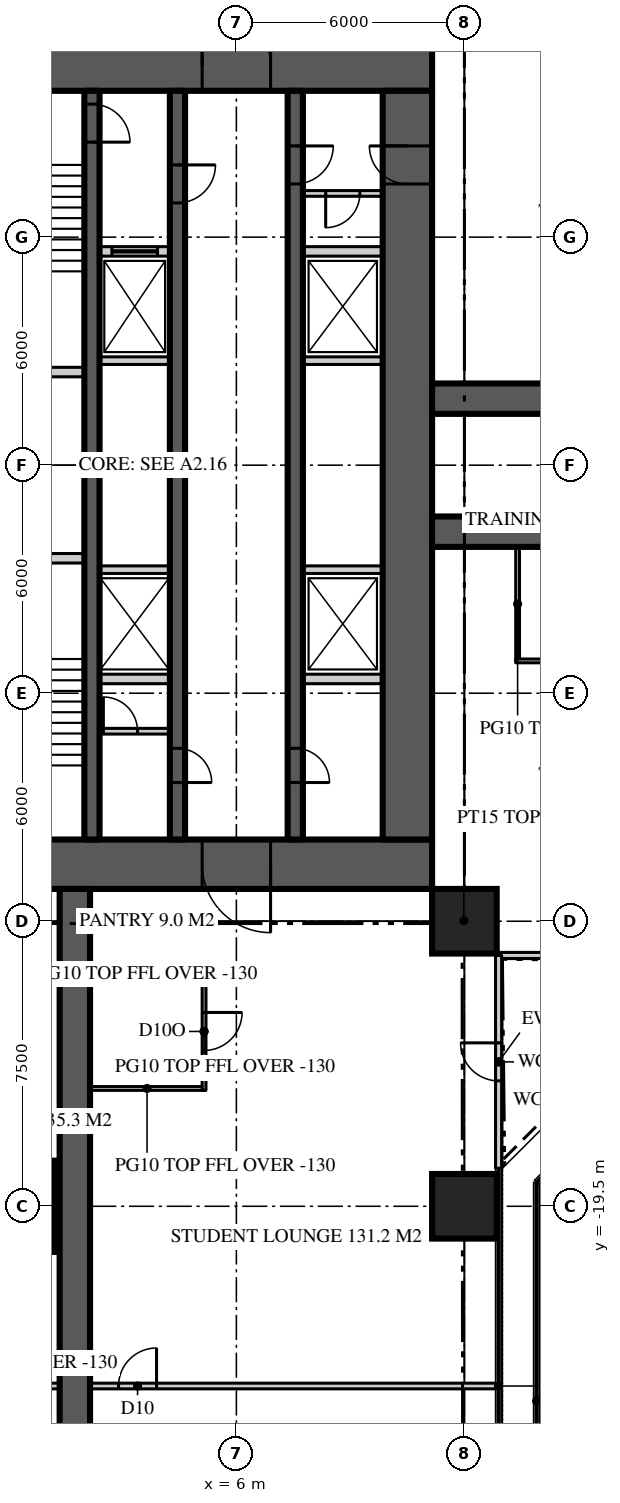
"""IFC4 building model, lengths in metres.
Left out: names, types, materials, properties, quantities, classifications, styles, units other than length and angle.
Written with IfcOpenShell. Run it as: python <this file> out.ifc"""

import sys

from ifc_helpers import new_model, si_unit, direction, frame, frame_2d, origin, origin_2d, place, context, subcontext, project, spatial, rectangle, extrude, element, fill, save


model = new_model("IFC4")
c1 = context("Model", 3, precision=1e-05, world=origin(), true_north=direction((0.0, 1.0)))
c2 = subcontext(c1, "Body", "Model", "MODEL_VIEW")
j1 = project(units=[si_unit("LENGTHUNIT", "METRE"), si_unit("PLANEANGLEUNIT", "RADIAN")], contexts=[c1])
p1 = place(None, origin())
s1 = spatial("IfcSite", under=j1, at=p1, CompositionType="ELEMENT")
p2 = place(p1, origin())
s2 = spatial("IfcBuilding", under=s1, at=p2, CompositionType="ELEMENT")
p3 = place(p2, frame((0.0, 0.0, 109.8)))
s3 = spatial("IfcBuildingStorey", under=s2, at=p3, CompositionType="ELEMENT", Elevation=109.8)
p4 = place(p3, frame((-11.15, 10.5, 0.0), z_axis=(0.0, 0.0, 1.0), x_axis=(1.0, 0.0, 0.0)))
e1 = element("IfcWall", 1, at=p4, inside=s3, PredefinedType="SHEAR", context=c2, shape_type="SweptSolid", body=[
    extrude(rectangle(XDim=22.3, YDim=1.3, at=frame_2d((11.15, 0.0))), origin(), (0.0, 0.0, 1.0), 3.9),
])
p5 = place(p4, frame((4.25, 0.0, 0.0)))
e2 = element("IfcOpeningElement", 2, at=p5, cuts=e1, PredefinedType="OPENING", context=c2, shape_type="SweptSolid", body=[
    extrude(rectangle(XDim=1.8, YDim=2.2, at=frame_2d((0.9, 1.1))), frame((0.0, 0.66, 0.0), z_axis=(0.0, -1.0, 0.0), x_axis=(1.0, 0.0, 0.0)), (0.0, 0.0, 1.0), 1.32),
])
p6 = place(p4, frame((16.25, 0.0, 0.0)))
e3 = element("IfcOpeningElement", 3, at=p6, cuts=e1, PredefinedType="OPENING", context=c2, shape_type="SweptSolid", body=[
    extrude(rectangle(XDim=1.8, YDim=2.2, at=frame_2d((0.9, 1.1))), frame((0.0, 0.66, 0.0), z_axis=(0.0, -1.0, 0.0), x_axis=(1.0, 0.0, 0.0)), (0.0, 0.0, 1.0), 1.32),
])
p7 = place(p3, frame((11.15, -10.5, 0.0), z_axis=(0.0, 0.0, 1.0), x_axis=(-1.0, 0.0, 0.0)))
e4 = element("IfcWall", 4, at=p7, inside=s3, PredefinedType="SHEAR", context=c2, shape_type="SweptSolid", body=[
    extrude(rectangle(XDim=22.3, YDim=1.3, at=frame_2d((11.15, 0.0))), origin(), (0.0, 0.0, 1.0), 3.9),
])
p8 = place(p7, frame((16.25, 0.0, 0.0)))
e5 = element("IfcOpeningElement", 5, at=p8, cuts=e4, PredefinedType="OPENING", context=c2, shape_type="SweptSolid", body=[
    extrude(rectangle(XDim=1.8, YDim=2.2, at=frame_2d((0.9, 1.1))), frame((0.0, 0.66, 0.0), z_axis=(0.0, -1.0, 0.0), x_axis=(1.0, 0.0, 0.0)), (0.0, 0.0, 1.0), 1.32),
])
p9 = place(p7, frame((4.25, 0.0, 0.0)))
e6 = element("IfcOpeningElement", 6, at=p9, cuts=e4, PredefinedType="OPENING", context=c2, shape_type="SweptSolid", body=[
    extrude(rectangle(XDim=1.8, YDim=2.2, at=frame_2d((0.9, 1.1))), frame((0.0, 0.66, 0.0), z_axis=(0.0, -1.0, 0.0), x_axis=(1.0, 0.0, 0.0)), (0.0, 0.0, 1.0), 1.32),
])
p10 = place(p3, frame((10.5, -9.85, 0.0), z_axis=(0.0, 0.0, 1.0), x_axis=(0.0, 1.0, 0.0)))
e7 = element("IfcWall", 7, at=p10, inside=s3, PredefinedType="SHEAR", context=c2, shape_type="SweptSolid", body=[
    extrude(rectangle(XDim=19.7, YDim=1.3, at=frame_2d((9.85, 0.0))), origin(), (0.0, 0.0, 1.0), 3.9),
])
p11 = place(p10, frame((17.25, 0.0, 0.0)))
e8 = element("IfcOpeningElement", 8, at=p11, cuts=e7, PredefinedType="OPENING", context=c2, shape_type="SweptSolid", body=[
    extrude(rectangle(XDim=1.0, YDim=2.2, at=frame_2d((0.5, 1.1))), frame((0.0, 0.66, 0.0), z_axis=(0.0, -1.0, 0.0), x_axis=(1.0, 0.0, 0.0)), (0.0, 0.0, 1.0), 1.32),
])
for number, where, z_axis, x_axis in (
    (9, (11.15, -1.75, 0.0), (0.0, 0.0, 1.0), (1.0, 0.0, 0.0)),
    (10, (11.15, 1.75, 0.0), (0.0, 0.0, 1.0), (1.0, 0.0, 0.0)),
    (11, (1.75, -11.15, 0.0), (0.0, 0.0, 1.0), (0.0, -1.0, 0.0)),
):
    element("IfcWall", number, at=place(p3, frame(where, z_axis=z_axis, x_axis=x_axis)), inside=s3, PredefinedType="SHEAR", context=c2, shape_type="SweptSolid", body=[
        extrude(rectangle(XDim=15.25, YDim=0.8, at=frame_2d((7.625, 0.0))), origin(), (0.0, 0.0, 1.0), 3.9),
    ])
p12 = place(p3, frame((0.0, -19.5, 0.0), z_axis=(0.0, 0.0, 1.0), x_axis=(1.0, 0.0, 0.0)))
e12 = element("IfcColumn", 12, at=p12, inside=s3, PredefinedType="COLUMN", context=c2, shape_type="SweptSolid", body=[
    extrude(rectangle(XDim=2.4, YDim=2.4, at=origin_2d()), origin(), (0.0, 0.0, 1.0), 3.9),
])
for number, where, z_axis, x_axis in (
    (13, (12.0, -19.5, 0.0), (0.0, 0.0, 1.0), (1.0, 0.0, 0.0)),
    (14, (12.0, -12.0, 0.0), (0.0, 0.0, 1.0), (1.0, 0.0, 0.0)),
):
    element("IfcColumn", number, at=place(p3, frame(where, z_axis=z_axis, x_axis=x_axis)), inside=s3, PredefinedType="COLUMN", context=c2, shape_type="SweptSolid", body=[
        extrude(rectangle(XDim=1.7, YDim=1.7, at=origin_2d()), origin(), (0.0, 0.0, 1.0), 3.9),
    ])
p13 = place(p3, frame((12.9, -12.9, 0.0), z_axis=(0.0, 0.0, 1.0), x_axis=(1.0, 0.0, 0.0)))
e15 = element("IfcWall", 15, at=p13, inside=s3, PredefinedType="SOLIDWALL", context=c2, shape_type="SweptSolid", body=[
    extrude(rectangle(XDim=5.6, YDim=0.16, at=frame_2d((2.8, 0.0))), origin(), (0.0, 0.0, 1.0), 3.77),
])
p14 = place(p3, frame((12.9, -18.5, 0.0), z_axis=(0.0, 0.0, 1.0), x_axis=(0.0, 1.0, 0.0)))
e16 = element("IfcWall", 16, at=p14, inside=s3, PredefinedType="SOLIDWALL", context=c2, shape_type="SweptSolid", body=[
    extrude(rectangle(XDim=5.6, YDim=0.16, at=frame_2d((2.8, 0.0))), origin(), (0.0, 0.0, 1.0), 3.77),
])
p15 = place(p14, frame((2.3, 0.0, 0.0)))
e17 = element("IfcOpeningElement", 17, at=p15, cuts=e16, PredefinedType="OPENING", context=c2, shape_type="SweptSolid", body=[
    extrude(rectangle(XDim=1.0, YDim=2.2, at=frame_2d((0.5, 1.1))), frame((0.0, 0.09, 0.0), z_axis=(0.0, -1.0, 0.0), x_axis=(1.0, 0.0, 0.0)), (0.0, 0.0, 1.0), 0.18),
])
p16 = place(p3, frame((7.55, 9.85, 0.0), z_axis=(0.0, 0.0, 1.0), x_axis=(0.0, -1.0, 0.0)))
e18 = element("IfcWall", 18, at=p16, inside=s3, PredefinedType="SHEAR", context=c2, shape_type="SweptSolid", body=[
    extrude(rectangle(XDim=19.7, YDim=0.4, at=frame_2d((9.85, 0.0))), origin(), (0.0, 0.0, 1.0), 3.9),
])
p17 = place(p16, frame((1.45, 0.0, 0.0)))
e19 = element("IfcOpeningElement", 19, at=p17, cuts=e18, PredefinedType="OPENING", context=c2, shape_type="SweptSolid", body=[
    extrude(rectangle(XDim=1.0, YDim=2.2, at=frame_2d((0.5, 1.1))), frame((0.0, 0.21, 0.0), z_axis=(0.0, -1.0, 0.0), x_axis=(1.0, 0.0, 0.0)), (0.0, 0.0, 1.0), 0.42),
])
p18 = place(p16, frame((17.3, 0.0, 0.0)))
e20 = element("IfcOpeningElement", 20, at=p18, cuts=e18, PredefinedType="OPENING", context=c2, shape_type="SweptSolid", body=[
    extrude(rectangle(XDim=0.9, YDim=2.1, at=frame_2d((0.45, 1.05))), frame((0.0, 0.21, 0.0), z_axis=(0.0, -1.0, 0.0), x_axis=(1.0, 0.0, 0.0)), (0.0, 0.0, 1.0), 0.42),
])
p19 = place(p3, frame((4.45, 9.85, 0.0), z_axis=(0.0, 0.0, 1.0), x_axis=(0.0, -1.0, 0.0)))
e21 = element("IfcWall", 21, at=p19, inside=s3, PredefinedType="SHEAR", context=c2, shape_type="SweptSolid", body=[
    extrude(rectangle(XDim=19.7, YDim=0.4, at=frame_2d((9.85, 0.0))), origin(), (0.0, 0.0, 1.0), 3.9),
])
p20 = place(p19, frame((1.95, 0.0, 0.0)))
e22 = element("IfcOpeningElement", 22, at=p20, cuts=e21, PredefinedType="OPENING", context=c2, shape_type="SweptSolid", body=[
    extrude(rectangle(XDim=1.0, YDim=2.2, at=frame_2d((0.5, 1.1))), frame((0.0, 0.21, 0.0), z_axis=(0.0, -1.0, 0.0), x_axis=(1.0, 0.0, 0.0)), (0.0, 0.0, 1.0), 0.42),
])
p21 = place(p19, frame((17.3, 0.0, 0.0)))
e23 = element("IfcOpeningElement", 23, at=p21, cuts=e21, PredefinedType="OPENING", context=c2, shape_type="SweptSolid", body=[
    extrude(rectangle(XDim=0.9, YDim=2.1, at=frame_2d((0.45, 1.05))), frame((0.0, 0.21, 0.0), z_axis=(0.0, -1.0, 0.0), x_axis=(1.0, 0.0, 0.0)), (0.0, 0.0, 1.0), 0.42),
])
p22 = place(p3, frame((2.2, 9.85, 0.0), z_axis=(0.0, 0.0, 1.0), x_axis=(0.0, -1.0, 0.0)))
e24 = element("IfcWall", 24, at=p22, inside=s3, PredefinedType="SHEAR", context=c2, shape_type="SweptSolid", body=[
    extrude(rectangle(XDim=19.7, YDim=0.4, at=frame_2d((9.85, 0.0))), origin(), (0.0, 0.0, 1.0), 3.9),
])
p23 = place(p22, frame((0.35, 0.0, 0.0)))
e25 = element("IfcOpeningElement", 25, at=p23, cuts=e24, PredefinedType="OPENING", context=c2, shape_type="SweptSolid", body=[
    extrude(rectangle(XDim=1.0, YDim=2.2, at=frame_2d((0.5, 1.1))), frame((0.0, 0.21, 0.0), z_axis=(0.0, -1.0, 0.0), x_axis=(1.0, 0.0, 0.0)), (0.0, 0.0, 1.0), 0.42),
])
p24 = place(p3, frame((2.4, 5.625, 0.0), z_axis=(0.0, 0.0, 1.0), x_axis=(1.0, 0.0, 0.0)))
e26 = element("IfcWall", 26, at=p24, inside=s3, PredefinedType="SOLIDWALL", context=c2, shape_type="SweptSolid", body=[
    extrude(rectangle(XDim=1.85, YDim=0.25, at=frame_2d((0.925, 0.0))), origin(), (0.0, 0.0, 1.0), 3.7),
])
p25 = place(p24, frame((0.325, 0.0, 0.0)))
e27 = element("IfcOpeningElement", 27, at=p25, cuts=e26, PredefinedType="OPENING", context=c2, shape_type="SweptSolid", body=[
    extrude(rectangle(XDim=1.2, YDim=2.2, at=frame_2d((0.6, 1.1))), frame((0.0, 0.135, 0.0), z_axis=(0.0, -1.0, 0.0), x_axis=(1.0, 0.0, 0.0)), (0.0, 0.0, 1.0), 0.27),
])
p26 = place(p3, frame((7.75, 5.625, 0.0), z_axis=(0.0, 0.0, 1.0), x_axis=(1.0, 0.0, 0.0)))
e28 = element("IfcWall", 28, at=p26, inside=s3, PredefinedType="SOLIDWALL", context=c2, shape_type="SweptSolid", body=[
    extrude(rectangle(XDim=2.1, YDim=0.25, at=frame_2d((1.05, 0.0))), origin(), (0.0, 0.0, 1.0), 3.7),
])
p27 = place(p3, frame((2.4, -5.625, 0.0), z_axis=(0.0, 0.0, 1.0), x_axis=(1.0, 0.0, 0.0)))
e29 = element("IfcWall", 29, at=p27, inside=s3, PredefinedType="SOLIDWALL", context=c2, shape_type="SweptSolid", body=[
    extrude(rectangle(XDim=1.85, YDim=0.25, at=frame_2d((0.925, 0.0))), origin(), (0.0, 0.0, 1.0), 3.7),
])
p28 = place(p3, frame((7.75, -5.625, 0.0), z_axis=(0.0, 0.0, 1.0), x_axis=(1.0, 0.0, 0.0)))
e30 = element("IfcWall", 30, at=p28, inside=s3, PredefinedType="SOLIDWALL", context=c2, shape_type="SweptSolid", body=[
    extrude(rectangle(XDim=2.1, YDim=0.25, at=frame_2d((1.05, 0.0))), origin(), (0.0, 0.0, 1.0), 3.7),
])
for number, where, z_axis, x_axis in (
    (31, (-2.0, -2.45, 0.0), (0.0, 0.0, 1.0), (1.0, 0.0, 0.0)),
    (32, (-2.0, 2.45, 0.0), (0.0, 0.0, 1.0), (1.0, 0.0, 0.0)),
):
    element("IfcWall", number, at=place(p3, frame(where, z_axis=z_axis, x_axis=x_axis)), inside=s3, PredefinedType="SOLIDWALL", context=c2, shape_type="SweptSolid", body=[
        extrude(rectangle(XDim=4.0, YDim=0.25, at=frame_2d((2.0, 0.0))), origin(), (0.0, 0.0, 1.0), 3.7),
    ])
p29 = place(p3, frame((2.4, -2.75, 0.0), z_axis=(0.0, 0.0, 1.0), x_axis=(1.0, 0.0, 0.0)))
e33 = element("IfcWall", 33, at=p29, inside=s3, PredefinedType="SOLIDWALL", context=c2, shape_type="SweptSolid", body=[
    extrude(rectangle(XDim=1.85, YDim=0.2, at=frame_2d((0.925, 0.0))), origin(), (0.0, 0.0, 1.0), 3.7),
])
p30 = place(p3, frame((7.75, -2.75, 0.0), z_axis=(0.0, 0.0, 1.0), x_axis=(1.0, 0.0, 0.0)))
e34 = element("IfcWall", 34, at=p30, inside=s3, PredefinedType="SOLIDWALL", context=c2, shape_type="SweptSolid", body=[
    extrude(rectangle(XDim=2.1, YDim=0.2, at=frame_2d((1.05, 0.0))), origin(), (0.0, 0.0, 1.0), 3.7),
])
p31 = place(p3, frame((2.4, 2.75, 0.0), z_axis=(0.0, 0.0, 1.0), x_axis=(1.0, 0.0, 0.0)))
e35 = element("IfcWall", 35, at=p31, inside=s3, PredefinedType="SOLIDWALL", context=c2, shape_type="SweptSolid", body=[
    extrude(rectangle(XDim=1.85, YDim=0.2, at=frame_2d((0.925, 0.0))), origin(), (0.0, 0.0, 1.0), 3.7),
])
p32 = place(p3, frame((7.75, 2.75, 0.0), z_axis=(0.0, 0.0, 1.0), x_axis=(1.0, 0.0, 0.0)))
e36 = element("IfcWall", 36, at=p32, inside=s3, PredefinedType="SOLIDWALL", context=c2, shape_type="SweptSolid", body=[
    extrude(rectangle(XDim=2.1, YDim=0.2, at=frame_2d((1.05, 0.0))), origin(), (0.0, 0.0, 1.0), 3.7),
])
p33 = place(p3, frame((13.4, -2.15, 0.0), z_axis=(0.0, 0.0, 1.0), x_axis=(0.0, -1.0, 0.0)))
e37 = element("IfcWall", 37, at=p33, inside=s3, PredefinedType="PARTITIONING", context=c2, shape_type="SweptSolid", body=[
    extrude(rectangle(XDim=3.0, YDim=0.1, at=frame_2d((1.5, 0.0))), origin(), (0.0, 0.0, 1.0), 3.77),
])
p34 = place(p3, frame((13.35, -5.15, 0.0), z_axis=(0.0, 0.0, 1.0), x_axis=(1.0, 0.0, 0.0)))
e38 = element("IfcWall", 38, at=p34, inside=s3, PredefinedType="PARTITIONING", context=c2, shape_type="SweptSolid", body=[
    extrude(rectangle(XDim=3.1, YDim=0.1, at=frame_2d((1.55, 0.0))), origin(), (0.0, 0.0, 1.0), 3.77),
])
p35 = place(p34, frame((1.05, 0.0, 0.0)))
e39 = element("IfcOpeningElement", 39, at=p35, cuts=e38, PredefinedType="OPENING", context=c2, shape_type="SweptSolid", body=[
    extrude(rectangle(XDim=1.0, YDim=2.2, at=frame_2d((0.5, 1.1))), frame((0.0, 0.06, 0.0), z_axis=(0.0, -1.0, 0.0), x_axis=(1.0, 0.0, 0.0)), (0.0, 0.0, 1.0), 0.12),
])
p36 = place(p3, frame((-12.82, -24.229, 0.0), z_axis=(0.0, 0.0, 1.0), x_axis=(1.0, 0.0, 0.0)))
e40 = element("IfcWall", 40, at=p36, inside=s3, PredefinedType="PARTITIONING", context=c2, shape_type="SweptSolid", body=[
    extrude(rectangle(XDim=25.64, YDim=0.15, at=frame_2d((12.82, 0.0))), origin(), (0.0, 0.0, 1.0), 3.77),
])
p37 = place(p36, frame((15.72, 0.0, 0.0)))
e41 = element("IfcOpeningElement", 41, at=p37, cuts=e40, PredefinedType="OPENING", context=c2, shape_type="SweptSolid", body=[
    extrude(rectangle(XDim=1.0, YDim=2.2, at=frame_2d((0.5, 1.1))), frame((0.0, 0.085, 0.0), z_axis=(0.0, -1.0, 0.0), x_axis=(1.0, 0.0, 0.0)), (0.0, 0.0, 1.0), 0.17),
])
p38 = place(p36, frame((8.92, 0.0, 0.0)))
e42 = element("IfcOpeningElement", 42, at=p38, cuts=e40, PredefinedType="OPENING", context=c2, shape_type="SweptSolid", body=[
    extrude(rectangle(XDim=1.0, YDim=2.2, at=frame_2d((0.5, 1.1))), frame((0.0, 0.085, 0.0), z_axis=(0.0, -1.0, 0.0), x_axis=(1.0, 0.0, 0.0)), (0.0, 0.0, 1.0), 0.17),
])
for number, where, z_axis, x_axis in (
    (43, (2.15, -13.4, 0.0), (0.0, 0.0, 1.0), (1.0, 0.0, 0.0)),
    (44, (2.15, -16.4, 0.0), (0.0, 0.0, 1.0), (1.0, 0.0, 0.0)),
):
    element("IfcWall", number, at=place(p3, frame(where, z_axis=z_axis, x_axis=x_axis)), inside=s3, PredefinedType="PARTITIONING", context=c2, shape_type="SweptSolid", body=[
        extrude(rectangle(XDim=3.0, YDim=0.1, at=frame_2d((1.5, 0.0))), origin(), (0.0, 0.0, 1.0), 3.77),
    ])
p39 = place(p3, frame((5.15, -13.35, 0.0), z_axis=(0.0, 0.0, 1.0), x_axis=(0.0, -1.0, 0.0)))
e45 = element("IfcWall", 45, at=p39, inside=s3, PredefinedType="PARTITIONING", context=c2, shape_type="SweptSolid", body=[
    extrude(rectangle(XDim=3.1, YDim=0.1, at=frame_2d((1.55, 0.0))), origin(), (0.0, 0.0, 1.0), 3.77),
])
p40 = place(p39, frame((1.05, 0.0, 0.0)))
e46 = element("IfcOpeningElement", 46, at=p40, cuts=e45, PredefinedType="OPENING", context=c2, shape_type="SweptSolid", body=[
    extrude(rectangle(XDim=1.0, YDim=2.2, at=frame_2d((0.5, 1.1))), frame((0.0, 0.06, 0.0), z_axis=(0.0, -1.0, 0.0), x_axis=(1.0, 0.0, 0.0)), (0.0, 0.0, 1.0), 0.12),
])
p41 = place(p3, frame((11.15, -11.15, 0.0), z_axis=(0.0, 0.0, 1.0), x_axis=(0.707106781187, -0.707106781187, 0.0)))
e47 = element("IfcWall", 47, at=p41, inside=s3, PredefinedType="PARTITIONING", context=c2, shape_type="SweptSolid", body=[
    extrude(rectangle(XDim=2.362, YDim=0.15, at=frame_2d((1.181, 0.0))), origin(), (0.0, 0.0, 1.0), 3.77),
])
p42 = place(p3, frame((2.4, -7.0, 0.0), z_axis=(0.0, 0.0, 1.0), x_axis=(1.0, 0.0, 0.0)))
e48 = element("IfcWall", 48, at=p42, inside=s3, PredefinedType="SOLIDWALL", context=c2, shape_type="SweptSolid", body=[
    extrude(rectangle(XDim=1.85, YDim=0.15, at=frame_2d((0.925, 0.0))), origin(), (0.0, 0.0, 1.0), 3.77),
])
p43 = place(p42, frame((0.1, 0.0, 0.0)))
e49 = element("IfcOpeningElement", 49, at=p43, cuts=e48, PredefinedType="OPENING", context=c2, shape_type="SweptSolid", body=[
    extrude(rectangle(XDim=0.9, YDim=2.1, at=frame_2d((0.45, 1.05))), frame((0.0, 0.085, 0.0), z_axis=(0.0, -1.0, 0.0), x_axis=(1.0, 0.0, 0.0)), (0.0, 0.0, 1.0), 0.17),
])
p44 = place(p3, frame((9.85, 7.15, 0.0), z_axis=(0.0, 0.0, 1.0), x_axis=(-1.0, 0.0, 0.0)))
e50 = element("IfcWall", 50, at=p44, inside=s3, PredefinedType="SOLIDWALL", context=c2, shape_type="SweptSolid", body=[
    extrude(rectangle(XDim=2.1, YDim=0.15, at=frame_2d((1.05, 0.0))), origin(), (0.0, 0.0, 1.0), 3.77),
])
p45 = place(p44, frame((0.6, 0.0, 0.0)))
e51 = element("IfcOpeningElement", 51, at=p45, cuts=e50, PredefinedType="OPENING", context=c2, shape_type="SweptSolid", body=[
    extrude(rectangle(XDim=0.9, YDim=2.1, at=frame_2d((0.45, 1.05))), frame((0.0, 0.085, 0.0), z_axis=(0.0, -1.0, 0.0), x_axis=(1.0, 0.0, 0.0)), (0.0, 0.0, 1.0), 0.17),
])
p46 = place(p15, origin())
e52 = element("IfcDoor", 52, at=p46, inside=s3, OperationType="SINGLE_SWING_RIGHT", PredefinedType="DOOR", context=c2, shape_type="SweptSolid", body=[
    extrude(rectangle(XDim=1.0, YDim=2.2, at=frame_2d((0.5, 1.1))), frame((0.0, 0.025, 0.0), z_axis=(0.0, -1.0, 0.0), x_axis=(1.0, 0.0, 0.0)), (0.0, 0.0, 1.0), 0.05),
])
fill(e17, e52)
p47 = place(p6, origin())
e53 = element("IfcDoor", 53, at=p47, inside=s3, OperationType="DOUBLE_DOOR_DOUBLE_SWING", PredefinedType="DOOR", context=c2, shape_type="SweptSolid", body=[
    extrude(rectangle(XDim=1.8, YDim=2.2, at=frame_2d((0.9, 1.1))), frame((0.0, 0.025, 0.0), z_axis=(0.0, -1.0, 0.0), x_axis=(1.0, 0.0, 0.0)), (0.0, 0.0, 1.0), 0.05),
])
fill(e3, e53)
p48 = place(p9, origin())
e54 = element("IfcDoor", 54, at=p48, inside=s3, OperationType="DOUBLE_DOOR_DOUBLE_SWING", PredefinedType="DOOR", context=c2, shape_type="SweptSolid", body=[
    extrude(rectangle(XDim=1.8, YDim=2.2, at=frame_2d((0.9, 1.1))), frame((0.0, 0.025, 0.0), z_axis=(0.0, -1.0, 0.0), x_axis=(1.0, 0.0, 0.0)), (0.0, 0.0, 1.0), 0.05),
])
fill(e6, e54)
p49 = place(p17, origin())
e55 = element("IfcDoor", 55, at=p49, inside=s3, OperationType="SINGLE_SWING_LEFT", PredefinedType="DOOR", context=c2, shape_type="SweptSolid", body=[
    extrude(rectangle(XDim=1.0, YDim=2.2, at=frame_2d((0.5, 1.1))), frame((0.0, 0.025, 0.0), z_axis=(0.0, -1.0, 0.0), x_axis=(1.0, 0.0, 0.0)), (0.0, 0.0, 1.0), 0.05),
])
fill(e19, e55)
p50 = place(p11, origin())
e56 = element("IfcDoor", 56, at=p50, inside=s3, OperationType="SINGLE_SWING_RIGHT", PredefinedType="DOOR", context=c2, shape_type="SweptSolid", body=[
    extrude(rectangle(XDim=1.0, YDim=2.2, at=frame_2d((0.5, 1.1))), frame((0.0, 0.025, 0.0), z_axis=(0.0, -1.0, 0.0), x_axis=(1.0, 0.0, 0.0)), (0.0, 0.0, 1.0), 0.05),
])
fill(e8, e56)
p51 = place(p20, origin())
e57 = element("IfcDoor", 57, at=p51, inside=s3, OperationType="SINGLE_SWING_LEFT", PredefinedType="DOOR", context=c2, shape_type="SweptSolid", body=[
    extrude(rectangle(XDim=1.0, YDim=2.2, at=frame_2d((0.5, 1.1))), frame((0.0, 0.025, 0.0), z_axis=(0.0, -1.0, 0.0), x_axis=(1.0, 0.0, 0.0)), (0.0, 0.0, 1.0), 0.05),
])
fill(e22, e57)
p52 = place(p23, origin())
e58 = element("IfcDoor", 58, at=p52, inside=s3, OperationType="SINGLE_SWING_RIGHT", PredefinedType="DOOR", context=c2, shape_type="SweptSolid", body=[
    extrude(rectangle(XDim=1.0, YDim=2.2, at=frame_2d((0.5, 1.1))), frame((0.0, 0.025, 0.0), z_axis=(0.0, -1.0, 0.0), x_axis=(1.0, 0.0, 0.0)), (0.0, 0.0, 1.0), 0.05),
])
fill(e25, e58)
p53 = place(p18, origin())
e59 = element("IfcDoor", 59, at=p53, inside=s3, OperationType="SINGLE_SWING_RIGHT", PredefinedType="DOOR", context=c2, shape_type="SweptSolid", body=[
    extrude(rectangle(XDim=0.9, YDim=2.1, at=frame_2d((0.45, 1.05))), frame((0.0, 0.025, 0.0), z_axis=(0.0, -1.0, 0.0), x_axis=(1.0, 0.0, 0.0)), (0.0, 0.0, 1.0), 0.05),
])
fill(e20, e59)
p54 = place(p21, origin())
e60 = element("IfcDoor", 60, at=p54, inside=s3, OperationType="SINGLE_SWING_RIGHT", PredefinedType="DOOR", context=c2, shape_type="SweptSolid", body=[
    extrude(rectangle(XDim=0.9, YDim=2.1, at=frame_2d((0.45, 1.05))), frame((0.0, 0.025, 0.0), z_axis=(0.0, -1.0, 0.0), x_axis=(1.0, 0.0, 0.0)), (0.0, 0.0, 1.0), 0.05),
])
fill(e23, e60)
p55 = place(p25, origin())
e61 = element("IfcDoor", 61, at=p55, inside=s3, OperationType="SLIDING_TO_LEFT", PredefinedType="DOOR", context=c2, shape_type="SweptSolid", body=[
    extrude(rectangle(XDim=1.2, YDim=2.2, at=frame_2d((0.6, 1.1))), frame((0.0, 0.025, 0.0), z_axis=(0.0, -1.0, 0.0), x_axis=(1.0, 0.0, 0.0)), (0.0, 0.0, 1.0), 0.05),
])
fill(e27, e61)
p56 = place(p37, origin())
e62 = element("IfcDoor", 62, at=p56, inside=s3, OperationType="SINGLE_SWING_RIGHT", PredefinedType="DOOR", context=c2, shape_type="SweptSolid", body=[
    extrude(rectangle(XDim=1.0, YDim=2.2, at=frame_2d((0.5, 1.1))), frame((0.0, 0.025, 0.0), z_axis=(0.0, -1.0, 0.0), x_axis=(1.0, 0.0, 0.0)), (0.0, 0.0, 1.0), 0.05),
])
fill(e41, e62)
p57 = place(p40, origin())
e63 = element("IfcDoor", 63, at=p57, inside=s3, OperationType="SINGLE_SWING_LEFT", PredefinedType="DOOR", context=c2, shape_type="SweptSolid", body=[
    extrude(rectangle(XDim=1.0, YDim=2.2, at=frame_2d((0.5, 1.1))), frame((0.0, 0.025, 0.0), z_axis=(0.0, -1.0, 0.0), x_axis=(1.0, 0.0, 0.0)), (0.0, 0.0, 1.0), 0.05),
])
fill(e46, e63)
p58 = place(p43, origin())
e64 = element("IfcDoor", 64, at=p58, inside=s3, OperationType="SINGLE_SWING_LEFT", PredefinedType="DOOR", context=c2, shape_type="SweptSolid", body=[
    extrude(rectangle(XDim=0.9, YDim=2.1, at=frame_2d((0.45, 1.05))), frame((0.0, 0.025, 0.0), z_axis=(0.0, -1.0, 0.0), x_axis=(1.0, 0.0, 0.0)), (0.0, 0.0, 1.0), 0.05),
])
fill(e49, e64)
p59 = place(p45, origin())
e65 = element("IfcDoor", 65, at=p59, inside=s3, OperationType="SINGLE_SWING_RIGHT", PredefinedType="DOOR", context=c2, shape_type="SweptSolid", body=[
    extrude(rectangle(XDim=0.9, YDim=2.1, at=frame_2d((0.45, 1.05))), frame((0.0, 0.025, 0.0), z_axis=(0.0, -1.0, 0.0), x_axis=(1.0, 0.0, 0.0)), (0.0, 0.0, 1.0), 0.05),
])
fill(e51, e65)
save(model, sys.argv[1])
